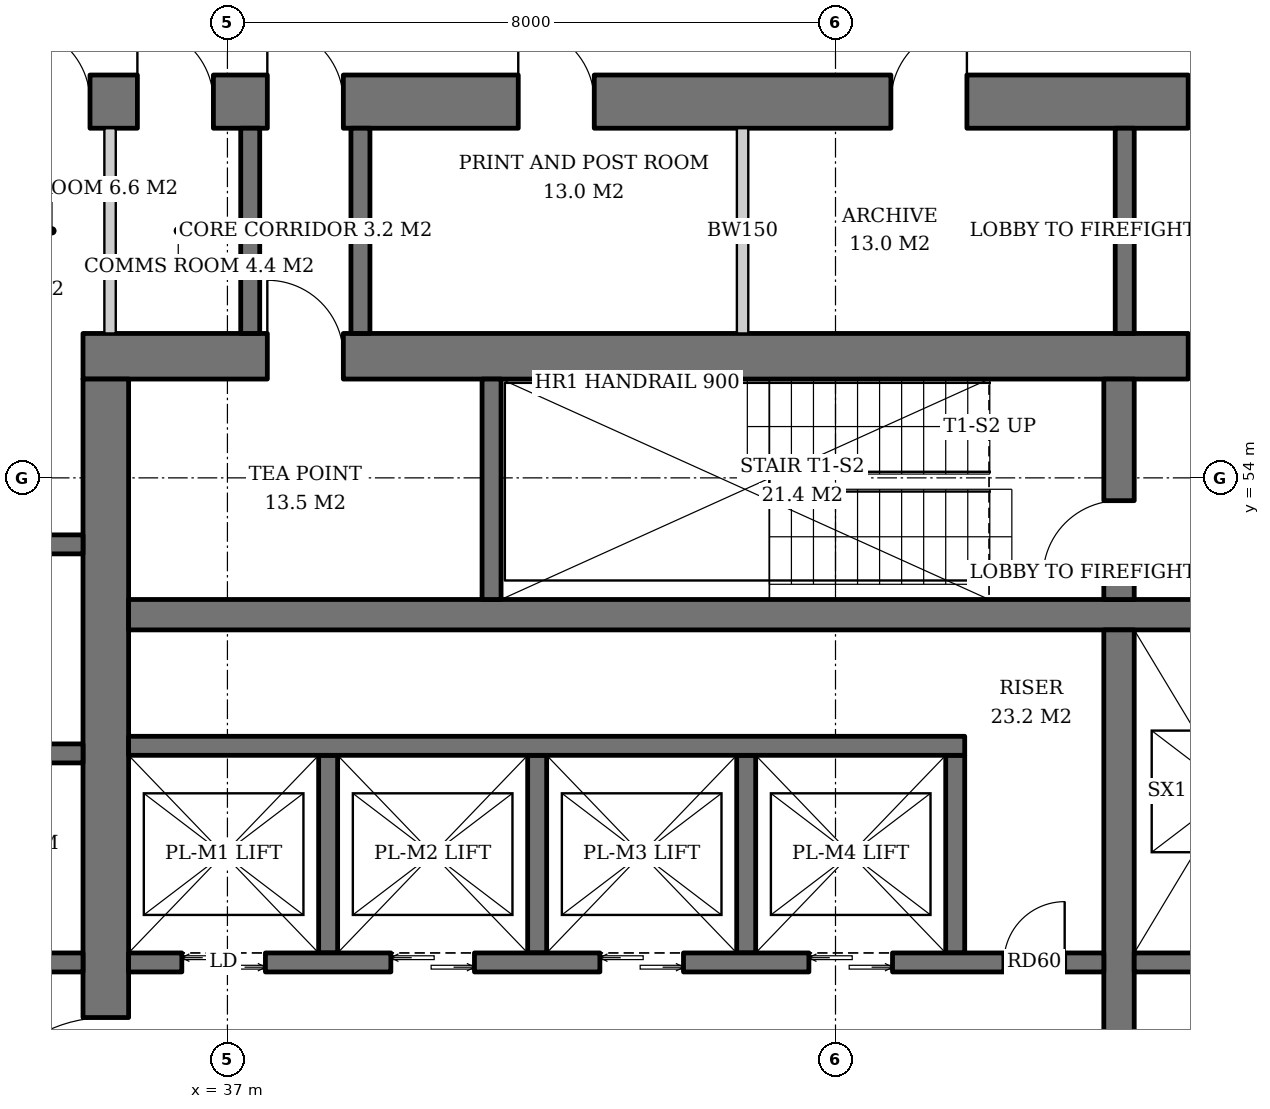
"""IFC4 building model, lengths in metres.
Left out: names, types, materials, properties, quantities, classifications, styles, units other than length and angle.
Written with IfcOpenShell. Run it as: python <this file> out.ifc"""

import sys

from ifc_helpers import new_model, si_unit, direction, frame, frame_2d, origin, place, context, subcontext, project, spatial, rectangle, extrude, element, fill, save


model = new_model("IFC4")
c1 = context("Model", 3, precision=1e-05, world=origin(), true_north=direction((0.0, 1.0)))
c2 = subcontext(c1, "Body", "Model", "MODEL_VIEW")
j1 = project(units=[si_unit("LENGTHUNIT", "METRE"), si_unit("PLANEANGLEUNIT", "RADIAN")], contexts=[c1])
p1 = place(None, origin())
s1 = spatial("IfcSite", under=j1, at=p1, CompositionType="ELEMENT")
p2 = place(p1, origin())
s2 = spatial("IfcBuilding", under=s1, at=p2, CompositionType="ELEMENT")
p3 = place(p2, frame((0.0, 0.0, 119.8)))
s3 = spatial("IfcBuildingStorey", under=s2, at=p3, CompositionType="ELEMENT", Elevation=119.8)
p4 = place(p3, frame((35.1, 55.6, 0.0), z_axis=(0.0, 0.0, 1.0), x_axis=(1.0, 0.0, 0.0)))
e1 = element("IfcWall", 1, at=p4, inside=s3, PredefinedType="SHEAR", context=c2, shape_type="SweptSolid", body=[
    extrude(rectangle(XDim=19.8, YDim=0.6, at=frame_2d((9.9, 0.0))), origin(), (0.0, 0.0, 1.0), 3.8),
])
p5 = place(p4, frame((14.54, 0.0, 0.0)))
e2 = element("IfcOpeningElement", 2, at=p5, cuts=e1, PredefinedType="OPENING", context=c2, shape_type="SweptSolid", body=[
    extrude(rectangle(XDim=1.0, YDim=2.1, at=frame_2d((0.5, 1.05))), frame((0.0, 0.31, 0.0), z_axis=(0.0, -1.0, 0.0), x_axis=(1.0, 0.0, 0.0)), (0.0, 0.0, 1.0), 0.62),
])
p6 = place(p4, frame((2.425, 0.0, 0.0)))
e3 = element("IfcOpeningElement", 3, at=p6, cuts=e1, PredefinedType="OPENING", context=c2, shape_type="SweptSolid", body=[
    extrude(rectangle(XDim=1.0, YDim=2.1, at=frame_2d((0.5, 1.05))), frame((0.0, 0.31, 0.0), z_axis=(0.0, -1.0, 0.0), x_axis=(1.0, 0.0, 0.0)), (0.0, 0.0, 1.0), 0.62),
])
p7 = place(p3, frame((35.4, 36.7, 0.0), z_axis=(0.0, 0.0, 1.0), x_axis=(0.0, 1.0, 0.0)))
e4 = element("IfcWall", 4, at=p7, inside=s3, PredefinedType="SHEAR", context=c2, shape_type="SweptSolid", body=[
    extrude(rectangle(XDim=18.6, YDim=0.6, at=frame_2d((9.3, 0.0))), origin(), (0.0, 0.0, 1.0), 3.8),
])
p8 = place(p7, frame((8.4, 0.0, 0.0)))
e5 = element("IfcOpeningElement", 5, at=p8, cuts=e4, PredefinedType="OPENING", context=c2, shape_type="SweptSolid", body=[
    extrude(rectangle(XDim=1.8, YDim=2.4, at=frame_2d((0.9, 1.2))), frame((0.0, 0.31, 0.0), z_axis=(0.0, -1.0, 0.0), x_axis=(1.0, 0.0, 0.0)), (0.0, 0.0, 1.0), 0.62),
])
p9 = place(p3, frame((31.7, 58.95, 0.0), z_axis=(0.0, 0.0, 1.0), x_axis=(1.0, 0.0, 0.0)))
e6 = element("IfcWall", 6, at=p9, inside=s3, PredefinedType="SHEAR", context=c2, shape_type="SweptSolid", body=[
    extrude(rectangle(XDim=26.6, YDim=0.7, at=frame_2d((13.3, 0.0))), origin(), (0.0, 0.0, 1.0), 3.8),
])
p10 = place(p9, frame((17.94, 0.0, 0.0)))
e7 = element("IfcOpeningElement", 7, at=p10, cuts=e6, PredefinedType="OPENING", context=c2, shape_type="SweptSolid", body=[
    extrude(rectangle(XDim=1.0, YDim=2.1, at=frame_2d((0.5, 1.05))), frame((0.0, 0.36, 0.0), z_axis=(0.0, -1.0, 0.0), x_axis=(1.0, 0.0, 0.0)), (0.0, 0.0, 1.0), 0.72),
])
p11 = place(p9, frame((5.825, 0.0, 0.0)))
e8 = element("IfcOpeningElement", 8, at=p11, cuts=e6, PredefinedType="OPENING", context=c2, shape_type="SweptSolid", body=[
    extrude(rectangle(XDim=1.0, YDim=2.1, at=frame_2d((0.5, 1.05))), frame((0.0, 0.36, 0.0), z_axis=(0.0, -1.0, 0.0), x_axis=(1.0, 0.0, 0.0)), (0.0, 0.0, 1.0), 0.72),
])
p12 = place(p9, frame((0.978, 0.0, 0.0)))
e9 = element("IfcOpeningElement", 9, at=p12, cuts=e6, PredefinedType="OPENING", context=c2, shape_type="SweptSolid", body=[
    extrude(rectangle(XDim=1.0, YDim=2.1, at=frame_2d((0.5, 1.05))), frame((0.0, 0.36, 0.0), z_axis=(0.0, -1.0, 0.0), x_axis=(1.0, 0.0, 0.0)), (0.0, 0.0, 1.0), 0.72),
])
p13 = place(p9, frame((2.492, 0.0, 0.0)))
e10 = element("IfcOpeningElement", 10, at=p13, cuts=e6, PredefinedType="OPENING", context=c2, shape_type="SweptSolid", body=[
    extrude(rectangle(XDim=1.0, YDim=2.1, at=frame_2d((0.5, 1.05))), frame((0.0, 0.36, 0.0), z_axis=(0.0, -1.0, 0.0), x_axis=(1.0, 0.0, 0.0)), (0.0, 0.0, 1.0), 0.72),
])
p14 = place(p9, frame((4.115, 0.0, 0.0)))
e11 = element("IfcOpeningElement", 11, at=p14, cuts=e6, PredefinedType="OPENING", context=c2, shape_type="SweptSolid", body=[
    extrude(rectangle(XDim=1.0, YDim=2.1, at=frame_2d((0.5, 1.05))), frame((0.0, 0.36, 0.0), z_axis=(0.0, -1.0, 0.0), x_axis=(1.0, 0.0, 0.0)), (0.0, 0.0, 1.0), 0.72),
])
p15 = place(p9, frame((9.126, 0.0, 0.0)))
e12 = element("IfcOpeningElement", 12, at=p15, cuts=e6, PredefinedType="OPENING", context=c2, shape_type="SweptSolid", body=[
    extrude(rectangle(XDim=1.0, YDim=2.1, at=frame_2d((0.5, 1.05))), frame((0.0, 0.36, 0.0), z_axis=(0.0, -1.0, 0.0), x_axis=(1.0, 0.0, 0.0)), (0.0, 0.0, 1.0), 0.72),
])
p16 = place(p9, frame((14.029, 0.0, 0.0)))
e13 = element("IfcOpeningElement", 13, at=p16, cuts=e6, PredefinedType="OPENING", context=c2, shape_type="SweptSolid", body=[
    extrude(rectangle(XDim=1.0, YDim=2.1, at=frame_2d((0.5, 1.05))), frame((0.0, 0.36, 0.0), z_axis=(0.0, -1.0, 0.0), x_axis=(1.0, 0.0, 0.0)), (0.0, 0.0, 1.0), 0.72),
])
p17 = place(p9, frame((22.4, 0.0, 0.0)))
e14 = element("IfcOpeningElement", 14, at=p17, cuts=e6, PredefinedType="OPENING", context=c2, shape_type="SweptSolid", body=[
    extrude(rectangle(XDim=1.0, YDim=2.1, at=frame_2d((0.5, 1.05))), frame((0.0, 0.36, 0.0), z_axis=(0.0, -1.0, 0.0), x_axis=(1.0, 0.0, 0.0)), (0.0, 0.0, 1.0), 0.72),
])
p18 = place(p3, frame((35.7, 52.2, 0.0), z_axis=(0.0, 0.0, 1.0), x_axis=(1.0, 0.0, 0.0)))
e15 = element("IfcWall", 15, at=p18, inside=s3, PredefinedType="SHEAR", context=c2, shape_type="SweptSolid", body=[
    extrude(rectangle(XDim=18.6, YDim=0.4, at=frame_2d((9.3, 0.0))), origin(), (0.0, 0.0, 1.0), 3.8),
])
p19 = place(p3, frame((48.73, 40.0, 0.0), z_axis=(0.0, 0.0, 1.0), x_axis=(0.0, 1.0, 0.0)))
e16 = element("IfcWall", 16, at=p19, inside=s3, PredefinedType="SHEAR", context=c2, shape_type="SweptSolid", body=[
    extrude(rectangle(XDim=12.0, YDim=0.4, at=frame_2d((6.0, 0.0))), origin(), (0.0, 0.0, 1.0), 3.8),
])
p20 = place(p3, frame((48.73, 52.4, 0.0), z_axis=(0.0, 0.0, 1.0), x_axis=(0.0, 1.0, 0.0)))
e17 = element("IfcWall", 17, at=p20, inside=s3, PredefinedType="SHEAR", context=c2, shape_type="SweptSolid", body=[
    extrude(rectangle(XDim=2.9, YDim=0.4, at=frame_2d((1.45, 0.0))), origin(), (0.0, 0.0, 1.0), 3.8),
])
p21 = place(p20, frame((0.3, 0.0, 0.0)))
e18 = element("IfcOpeningElement", 18, at=p21, cuts=e17, PredefinedType="OPENING", context=c2, shape_type="SweptSolid", body=[
    extrude(rectangle(XDim=1.0, YDim=2.1, at=frame_2d((0.5, 1.05))), frame((0.0, 0.21, 0.0), z_axis=(0.0, -1.0, 0.0), x_axis=(1.0, 0.0, 0.0)), (0.0, 0.0, 1.0), 0.42),
])
p22 = place(p3, frame((40.475, 52.4, 0.0), z_axis=(0.0, 0.0, 1.0), x_axis=(0.0, 1.0, 0.0)))
e19 = element("IfcWall", 19, at=p22, inside=s3, PredefinedType="SHEAR", context=c2, shape_type="SweptSolid", body=[
    extrude(rectangle(XDim=2.9, YDim=0.25, at=frame_2d((1.45, 0.0))), origin(), (0.0, 0.0, 1.0), 3.8),
])
for number, where, z_axis, x_axis in (
    (20, (38.325, 47.75, 0.0), (0.0, 0.0, 1.0), (0.0, 1.0, 0.0)),
    (21, (41.075, 47.75, 0.0), (0.0, 0.0, 1.0), (0.0, 1.0, 0.0)),
    (22, (43.825, 47.75, 0.0), (0.0, 0.0, 1.0), (0.0, 1.0, 0.0)),
    (23, (46.575, 47.75, 0.0), (0.0, 0.0, 1.0), (0.0, 1.0, 0.0)),
):
    element("IfcWall", number, at=place(p3, frame(where, z_axis=z_axis, x_axis=x_axis)), inside=s3, PredefinedType="SHEAR", context=c2, shape_type="SweptSolid", body=[
        extrude(rectangle(XDim=2.6, YDim=0.25, at=frame_2d((1.3, 0.0))), origin(), (0.0, 0.0, 1.0), 3.8),
    ])
p23 = place(p3, frame((35.7, 50.475, 0.0), z_axis=(0.0, 0.0, 1.0), x_axis=(1.0, 0.0, 0.0)))
e24 = element("IfcWall", 24, at=p23, inside=s3, PredefinedType="SHEAR", context=c2, shape_type="SweptSolid", body=[
    extrude(rectangle(XDim=11.0, YDim=0.25, at=frame_2d((5.5, 0.0))), origin(), (0.0, 0.0, 1.0), 3.8),
])
p24 = place(p3, frame((35.7, 47.625, 0.0), z_axis=(0.0, 0.0, 1.0), x_axis=(1.0, 0.0, 0.0)))
e25 = element("IfcWall", 25, at=p24, inside=s3, PredefinedType="SHEAR", context=c2, shape_type="SweptSolid", body=[
    extrude(rectangle(XDim=12.83, YDim=0.25, at=frame_2d((6.415, 0.0))), origin(), (0.0, 0.0, 1.0), 3.8),
])
p25 = place(p24, frame((0.7, 0.0, 0.0)))
e26 = element("IfcOpeningElement", 26, at=p25, cuts=e25, PredefinedType="OPENING", context=c2, shape_type="SweptSolid", body=[
    extrude(rectangle(XDim=1.1, YDim=2.2, at=frame_2d((0.55, 1.1))), frame((0.0, 0.135, 0.0), z_axis=(0.0, -1.0, 0.0), x_axis=(1.0, 0.0, 0.0)), (0.0, 0.0, 1.0), 0.27),
])
p26 = place(p24, frame((3.45, 0.0, 0.0)))
e27 = element("IfcOpeningElement", 27, at=p26, cuts=e25, PredefinedType="OPENING", context=c2, shape_type="SweptSolid", body=[
    extrude(rectangle(XDim=1.1, YDim=2.2, at=frame_2d((0.55, 1.1))), frame((0.0, 0.135, 0.0), z_axis=(0.0, -1.0, 0.0), x_axis=(1.0, 0.0, 0.0)), (0.0, 0.0, 1.0), 0.27),
])
p27 = place(p24, frame((6.2, 0.0, 0.0)))
e28 = element("IfcOpeningElement", 28, at=p27, cuts=e25, PredefinedType="OPENING", context=c2, shape_type="SweptSolid", body=[
    extrude(rectangle(XDim=1.1, YDim=2.2, at=frame_2d((0.55, 1.1))), frame((0.0, 0.135, 0.0), z_axis=(0.0, -1.0, 0.0), x_axis=(1.0, 0.0, 0.0)), (0.0, 0.0, 1.0), 0.27),
])
p28 = place(p24, frame((8.95, 0.0, 0.0)))
e29 = element("IfcOpeningElement", 29, at=p28, cuts=e25, PredefinedType="OPENING", context=c2, shape_type="SweptSolid", body=[
    extrude(rectangle(XDim=1.1, YDim=2.2, at=frame_2d((0.55, 1.1))), frame((0.0, 0.135, 0.0), z_axis=(0.0, -1.0, 0.0), x_axis=(1.0, 0.0, 0.0)), (0.0, 0.0, 1.0), 0.27),
])
p29 = place(p24, frame((11.515, 0.0, 0.0)))
e30 = element("IfcOpeningElement", 30, at=p29, cuts=e25, PredefinedType="OPENING", context=c2, shape_type="SweptSolid", body=[
    extrude(rectangle(XDim=0.8, YDim=2.0, at=frame_2d((0.4, 1.0))), frame((0.0, 0.135, 0.0), z_axis=(0.0, -1.0, 0.0), x_axis=(1.0, 0.0, 0.0)), (0.0, 0.0, 1.0), 0.27),
])
p30 = place(p3, frame((48.93, 47.625, 0.0), z_axis=(0.0, 0.0, 1.0), x_axis=(1.0, 0.0, 0.0)))
e31 = element("IfcWall", 31, at=p30, inside=s3, PredefinedType="SHEAR", context=c2, shape_type="SweptSolid", body=[
    extrude(rectangle(XDim=5.37, YDim=0.25, at=frame_2d((2.685, 0.0))), origin(), (0.0, 0.0, 1.0), 3.8),
])
for number, where, z_axis, x_axis in (
    (32, (32.4, 47.625, 0.0), (0.0, 0.0, 1.0), (1.0, 0.0, 0.0)),
    (33, (32.4, 50.375, 0.0), (0.0, 0.0, 1.0), (1.0, 0.0, 0.0)),
    (34, (32.4, 53.125, 0.0), (0.0, 0.0, 1.0), (1.0, 0.0, 0.0)),
):
    element("IfcWall", number, at=place(p3, frame(where, z_axis=z_axis, x_axis=x_axis)), inside=s3, PredefinedType="SHEAR", context=c2, shape_type="SweptSolid", body=[
        extrude(rectangle(XDim=2.7, YDim=0.25, at=frame_2d((1.35, 0.0))), origin(), (0.0, 0.0, 1.0), 3.8),
    ])
for number, where, z_axis, x_axis in (
    (35, (48.805, 55.9, 0.0), (0.0, 0.0, 1.0), (0.0, 1.0, 0.0)),
    (36, (37.3, 55.9, 0.0), (0.0, 0.0, 1.0), (0.0, 1.0, 0.0)),
    (37, (38.75, 55.9, 0.0), (0.0, 0.0, 1.0), (0.0, 1.0, 0.0)),
):
    element("IfcWall", number, at=place(p3, frame(where, z_axis=z_axis, x_axis=x_axis)), inside=s3, PredefinedType="SOLIDWALL", context=c2, shape_type="SweptSolid", body=[
        extrude(rectangle(XDim=2.7, YDim=0.25, at=frame_2d((1.35, 0.0))), origin(), (0.0, 0.0, 1.0), 3.62),
    ])
for number, where, z_axis, x_axis in (
    (38, (35.456, 55.9, 0.0), (0.0, 0.0, 1.0), (0.0, 1.0, 0.0)),
    (39, (43.778, 55.9, 0.0), (0.0, 0.0, 1.0), (0.0, 1.0, 0.0)),
):
    element("IfcWall", number, at=place(p3, frame(where, z_axis=z_axis, x_axis=x_axis)), inside=s3, PredefinedType="SOLIDWALL", context=c2, shape_type="SweptSolid", body=[
        extrude(rectangle(XDim=2.7, YDim=0.15, at=frame_2d((1.35, 0.0))), origin(), (0.0, 0.0, 1.0), 3.62),
    ])
p31 = place(p25, origin())
e40 = element("IfcDoor", 40, at=p31, inside=s3, OperationType="DOUBLE_DOOR_SLIDING", PredefinedType="DOOR", context=c2, shape_type="SweptSolid", body=[
    extrude(rectangle(XDim=1.1, YDim=2.2, at=frame_2d((0.55, 1.1))), frame((0.0, 0.025, 0.0), z_axis=(0.0, -1.0, 0.0), x_axis=(1.0, 0.0, 0.0)), (0.0, 0.0, 1.0), 0.05),
])
fill(e26, e40)
p32 = place(p26, origin())
e41 = element("IfcDoor", 41, at=p32, inside=s3, OperationType="DOUBLE_DOOR_SLIDING", PredefinedType="DOOR", context=c2, shape_type="SweptSolid", body=[
    extrude(rectangle(XDim=1.1, YDim=2.2, at=frame_2d((0.55, 1.1))), frame((0.0, 0.025, 0.0), z_axis=(0.0, -1.0, 0.0), x_axis=(1.0, 0.0, 0.0)), (0.0, 0.0, 1.0), 0.05),
])
fill(e27, e41)
p33 = place(p27, origin())
e42 = element("IfcDoor", 42, at=p33, inside=s3, OperationType="DOUBLE_DOOR_SLIDING", PredefinedType="DOOR", context=c2, shape_type="SweptSolid", body=[
    extrude(rectangle(XDim=1.1, YDim=2.2, at=frame_2d((0.55, 1.1))), frame((0.0, 0.025, 0.0), z_axis=(0.0, -1.0, 0.0), x_axis=(1.0, 0.0, 0.0)), (0.0, 0.0, 1.0), 0.05),
])
fill(e28, e42)
p34 = place(p28, origin())
e43 = element("IfcDoor", 43, at=p34, inside=s3, OperationType="DOUBLE_DOOR_SLIDING", PredefinedType="DOOR", context=c2, shape_type="SweptSolid", body=[
    extrude(rectangle(XDim=1.1, YDim=2.2, at=frame_2d((0.55, 1.1))), frame((0.0, 0.025, 0.0), z_axis=(0.0, -1.0, 0.0), x_axis=(1.0, 0.0, 0.0)), (0.0, 0.0, 1.0), 0.05),
])
fill(e29, e43)
p35 = place(p29, origin())
e44 = element("IfcDoor", 44, at=p35, inside=s3, OperationType="SINGLE_SWING_RIGHT", PredefinedType="DOOR", context=c2, shape_type="SweptSolid", body=[
    extrude(rectangle(XDim=0.8, YDim=2.0, at=frame_2d((0.4, 1.0))), frame((0.0, 0.025, 0.0), z_axis=(0.0, -1.0, 0.0), x_axis=(1.0, 0.0, 0.0)), (0.0, 0.0, 1.0), 0.05),
])
fill(e30, e44)
p36 = place(p21, origin())
e45 = element("IfcDoor", 45, at=p36, inside=s3, OperationType="SINGLE_SWING_LEFT", PredefinedType="DOOR", context=c2, shape_type="SweptSolid", body=[
    extrude(rectangle(XDim=1.0, YDim=2.1, at=frame_2d((0.5, 1.05))), frame((0.0, 0.025, 0.0), z_axis=(0.0, -1.0, 0.0), x_axis=(1.0, 0.0, 0.0)), (0.0, 0.0, 1.0), 0.05),
])
fill(e18, e45)
p37 = place(p5, origin())
e46 = element("IfcDoor", 46, at=p37, inside=s3, OperationType="SINGLE_SWING_RIGHT", PredefinedType="DOOR", context=c2, shape_type="SweptSolid", body=[
    extrude(rectangle(XDim=1.0, YDim=2.1, at=frame_2d((0.5, 1.05))), frame((0.0, 0.025, 0.0), z_axis=(0.0, -1.0, 0.0), x_axis=(1.0, 0.0, 0.0)), (0.0, 0.0, 1.0), 0.05),
])
fill(e2, e46)
p38 = place(p8, origin())
e47 = element("IfcDoor", 47, at=p38, inside=s3, OperationType="DOUBLE_DOOR_SINGLE_SWING", PredefinedType="DOOR", context=c2, shape_type="SweptSolid", body=[
    extrude(rectangle(XDim=1.8, YDim=2.4, at=frame_2d((0.9, 1.2))), frame((0.0, 0.025, 0.0), z_axis=(0.0, -1.0, 0.0), x_axis=(1.0, 0.0, 0.0)), (0.0, 0.0, 1.0), 0.05),
])
fill(e5, e47)
p39 = place(p10, origin())
e48 = element("IfcDoor", 48, at=p39, inside=s3, OperationType="SINGLE_SWING_RIGHT", PredefinedType="DOOR", context=c2, shape_type="SweptSolid", body=[
    extrude(rectangle(XDim=1.0, YDim=2.1, at=frame_2d((0.5, 1.05))), frame((0.0, 0.025, 0.0), z_axis=(0.0, -1.0, 0.0), x_axis=(1.0, 0.0, 0.0)), (0.0, 0.0, 1.0), 0.05),
])
fill(e7, e48)
p40 = place(p11, origin())
e49 = element("IfcDoor", 49, at=p40, inside=s3, OperationType="SINGLE_SWING_LEFT", PredefinedType="DOOR", context=c2, shape_type="SweptSolid", body=[
    extrude(rectangle(XDim=1.0, YDim=2.1, at=frame_2d((0.5, 1.05))), frame((0.0, 0.025, 0.0), z_axis=(0.0, -1.0, 0.0), x_axis=(1.0, 0.0, 0.0)), (0.0, 0.0, 1.0), 0.05),
])
fill(e8, e49)
p41 = place(p6, origin())
e50 = element("IfcDoor", 50, at=p41, inside=s3, OperationType="SINGLE_SWING_LEFT", PredefinedType="DOOR", context=c2, shape_type="SweptSolid", body=[
    extrude(rectangle(XDim=1.0, YDim=2.1, at=frame_2d((0.5, 1.05))), frame((0.0, -0.24, 0.0), z_axis=(0.0, -1.0, 0.0), x_axis=(1.0, 0.0, 0.0)), (0.0, 0.0, 1.0), 0.05),
])
fill(e3, e50)
p42 = place(p13, origin())
e51 = element("IfcDoor", 51, at=p42, inside=s3, OperationType="SINGLE_SWING_LEFT", PredefinedType="DOOR", context=c2, shape_type="SweptSolid", body=[
    extrude(rectangle(XDim=1.0, YDim=2.1, at=frame_2d((0.5, 1.05))), frame((0.0, -0.29, 0.0), z_axis=(0.0, -1.0, 0.0), x_axis=(1.0, 0.0, 0.0)), (0.0, 0.0, 1.0), 0.05),
])
fill(e10, e51)
p43 = place(p14, origin())
e52 = element("IfcDoor", 52, at=p43, inside=s3, OperationType="SINGLE_SWING_LEFT", PredefinedType="DOOR", context=c2, shape_type="SweptSolid", body=[
    extrude(rectangle(XDim=1.0, YDim=2.1, at=frame_2d((0.5, 1.05))), frame((0.0, -0.29, 0.0), z_axis=(0.0, -1.0, 0.0), x_axis=(1.0, 0.0, 0.0)), (0.0, 0.0, 1.0), 0.05),
])
fill(e11, e52)
p44 = place(p15, origin())
e53 = element("IfcDoor", 53, at=p44, inside=s3, OperationType="SINGLE_SWING_LEFT", PredefinedType="DOOR", context=c2, shape_type="SweptSolid", body=[
    extrude(rectangle(XDim=1.0, YDim=2.1, at=frame_2d((0.5, 1.05))), frame((0.0, -0.29, 0.0), z_axis=(0.0, -1.0, 0.0), x_axis=(1.0, 0.0, 0.0)), (0.0, 0.0, 1.0), 0.05),
])
fill(e12, e53)
p45 = place(p16, origin())
e54 = element("IfcDoor", 54, at=p45, inside=s3, OperationType="SINGLE_SWING_RIGHT", PredefinedType="DOOR", context=c2, shape_type="SweptSolid", body=[
    extrude(rectangle(XDim=1.0, YDim=2.1, at=frame_2d((0.5, 1.05))), frame((0.0, -0.29, 0.0), z_axis=(0.0, -1.0, 0.0), x_axis=(1.0, 0.0, 0.0)), (0.0, 0.0, 1.0), 0.05),
])
fill(e13, e54)
save(model, sys.argv[1])
